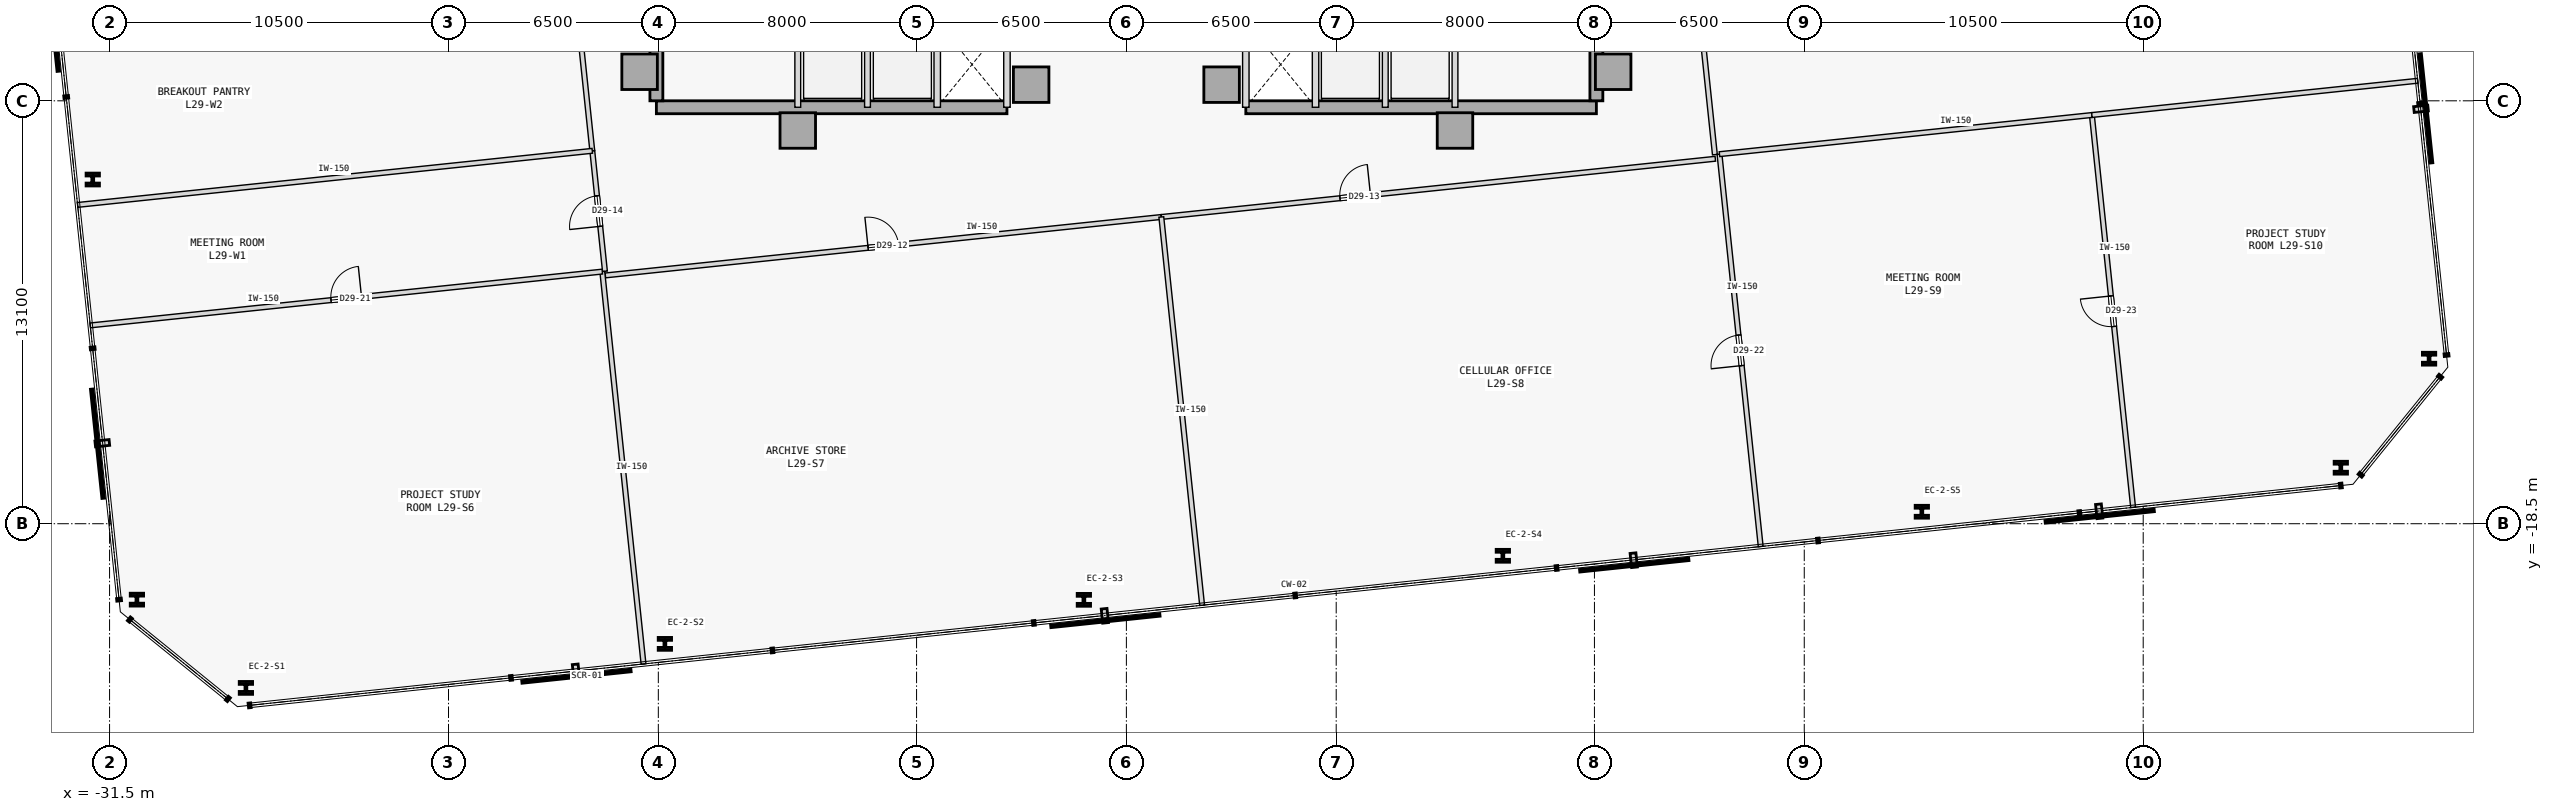
"""IFC4 building model, lengths in metres.
Left out: names, types, materials, properties, quantities, classifications, styles, units other than length and angle.
Written with IfcOpenShell. Run it as: python <this file> out.ifc"""

import sys

from ifc_helpers import new_model, si_unit, direction, frame, frame_2d, origin, origin_2d, place, context, subcontext, project, spatial, rectangle, i_section, extrude, element, fill, save


model = new_model("IFC4")
c1 = context("Model", 3, precision=1e-05, world=origin(), true_north=direction((0.0, 1.0)))
c2 = subcontext(c1, "Body", "Model", "MODEL_VIEW")
j1 = project(units=[si_unit("LENGTHUNIT", "METRE"), si_unit("PLANEANGLEUNIT", "RADIAN")], contexts=[c1])
p1 = place(None, origin())
s1 = spatial("IfcSite", under=j1, at=p1, CompositionType="ELEMENT")
p2 = place(p1, origin())
s2 = spatial("IfcBuilding", under=s1, at=p2, CompositionType="ELEMENT")
p3 = place(p2, frame((0.0, 0.0, 117.0)))
s3 = spatial("IfcBuildingStorey", under=s2, at=p3, CompositionType="ELEMENT", Elevation=117.0)
for number, where, z_axis, x_axis in (
    (1, (-15.08, -4.5, 0.0), (0.0, 0.0, 1.0), (1.0, 0.0, 0.0)),
    (2, (-10.18, -6.32, 0.0), (0.0, 0.0, 1.0), (1.0, 0.0, 0.0)),
    (3, (-2.95, -4.9, 0.0), (0.0, 0.0, 1.0), (1.0, 0.0, 0.0)),
    (4, (15.08, -4.5, 0.0), (0.0, 0.0, 1.0), (1.0, 0.0, 0.0)),
    (5, (10.18, -6.32, 0.0), (0.0, 0.0, 1.0), (1.0, 0.0, 0.0)),
    (6, (2.95, -4.9, 0.0), (0.0, 0.0, 1.0), (1.0, 0.0, 0.0)),
):
    element("IfcColumn", number, at=place(p3, frame(where, z_axis=z_axis, x_axis=x_axis)), inside=s3, PredefinedType="COLUMN", context=c2, shape_type="SweptSolid", body=[
        extrude(rectangle(XDim=1.1, YDim=1.1, at=origin_2d()), origin(), (0.0, 0.0, 1.0), 3.7),
    ])
p4 = place(p3, frame((-14.56, -5.6, 0.0), z_axis=(0.0, 0.0, 1.0), x_axis=(1.0, 0.0, 0.0)))
e7 = element("IfcWall", 7, at=p4, inside=s3, PredefinedType="SHEAR", context=c2, shape_type="SweptSolid", body=[
    extrude(rectangle(XDim=10.86, YDim=0.4, at=frame_2d((5.43, 0.0))), origin(), (0.0, 0.0, 1.0), 3.475),
])
p5 = place(p3, frame((-14.56, -5.4, 0.0), z_axis=(0.0, 0.0, 1.0), x_axis=(0.0, 1.0, 0.0)))
e8 = element("IfcWall", 8, at=p5, inside=s3, PredefinedType="SHEAR", context=c2, shape_type="SweptSolid", body=[
    extrude(rectangle(XDim=10.8, YDim=0.4, at=frame_2d((5.4, 0.0))), origin(), (0.0, 0.0, 1.0), 3.475),
])
p6 = place(p3, frame((3.7, -5.6, 0.0), z_axis=(0.0, 0.0, 1.0), x_axis=(1.0, 0.0, 0.0)))
e9 = element("IfcWall", 9, at=p6, inside=s3, PredefinedType="SHEAR", context=c2, shape_type="SweptSolid", body=[
    extrude(rectangle(XDim=10.86, YDim=0.4, at=frame_2d((5.43, 0.0))), origin(), (0.0, 0.0, 1.0), 3.475),
])
p7 = place(p3, frame((14.56, -5.4, 0.0), z_axis=(0.0, 0.0, 1.0), x_axis=(0.0, 1.0, 0.0)))
e10 = element("IfcWall", 10, at=p7, inside=s3, PredefinedType="SHEAR", context=c2, shape_type="SweptSolid", body=[
    extrude(rectangle(XDim=10.8, YDim=0.4, at=frame_2d((5.4, 0.0))), origin(), (0.0, 0.0, 1.0), 3.475),
])
for number, where, z_axis, x_axis in (
    (11, (-27.276, -23.586, 0.0), (0.0, 0.0, 1.0), (1.0, 0.0, 0.0)),
    (12, (-14.297, -22.222, 0.0), (0.0, 0.0, 1.0), (1.0, 0.0, 0.0)),
    (13, (-1.317, -20.858, 0.0), (0.0, 0.0, 1.0), (1.0, 0.0, 0.0)),
    (14, (11.663, -19.494, 0.0), (0.0, 0.0, 1.0), (1.0, 0.0, 0.0)),
    (15, (24.642, -18.129, 0.0), (0.0, 0.0, 1.0), (1.0, 0.0, 0.0)),
    (16, (37.622, -16.765, 0.0), (0.0, 0.0, 1.0), (1.0, 0.0, 0.0)),
    (17, (40.356, -13.389, 0.0), (0.0, 0.0, 1.0), (1.0, 0.0, 0.0)),
    (18, (-32.021, -7.838, 0.0), (0.0, 0.0, 1.0), (1.0, 0.0, 0.0)),
    (19, (-30.653, -20.852, 0.0), (0.0, 0.0, 1.0), (1.0, 0.0, 0.0)),
):
    element("IfcColumn", number, at=place(p3, frame(where, z_axis=z_axis, x_axis=x_axis)), inside=s3, PredefinedType="COLUMN", context=c2, shape_type="SweptSolid", body=[
        extrude(i_section(OverallWidth=0.413, OverallDepth=0.398, WebThickness=0.056, FlangeThickness=0.089, FilletRadius=0.015, at=origin_2d()), origin(), (0.0, 0.0, 1.0), 3.7),
    ])
for number, where, z_axis, x_axis in (
    (20, (-3.7, -5.6, 0.0), (0.0, 0.0, 1.0), (0.0, 1.0, 0.0)),
    (21, (-5.86, -5.6, 0.0), (0.0, 0.0, 1.0), (0.0, 1.0, 0.0)),
):
    element("IfcWall", number, at=place(p3, frame(where, z_axis=z_axis, x_axis=x_axis)), inside=s3, PredefinedType="STANDARD", context=c2, shape_type="SweptSolid", body=[
        extrude(rectangle(XDim=2.65, YDim=0.2, at=frame_2d((1.325, 0.0))), origin(), (0.0, 0.0, 1.0), 3.475),
    ])
for number, where, z_axis, x_axis in (
    (22, (-10.18, -5.6, 0.0), (0.0, 0.0, 1.0), (0.0, 1.0, 0.0)),
    (23, (-8.02, -5.6, 0.0), (0.0, 0.0, 1.0), (0.0, 1.0, 0.0)),
):
    element("IfcWall", number, at=place(p3, frame(where, z_axis=z_axis, x_axis=x_axis)), inside=s3, PredefinedType="STANDARD", context=c2, shape_type="SweptSolid", body=[
        extrude(rectangle(XDim=2.65, YDim=0.18, at=frame_2d((1.325, 0.0))), origin(), (0.0, 0.0, 1.0), 3.475),
    ])
for number, where, z_axis, x_axis in (
    (24, (3.7, -5.6, 0.0), (0.0, 0.0, 1.0), (0.0, 1.0, 0.0)),
    (25, (5.86, -5.6, 0.0), (0.0, 0.0, 1.0), (0.0, 1.0, 0.0)),
):
    element("IfcWall", number, at=place(p3, frame(where, z_axis=z_axis, x_axis=x_axis)), inside=s3, PredefinedType="STANDARD", context=c2, shape_type="SweptSolid", body=[
        extrude(rectangle(XDim=2.65, YDim=0.2, at=frame_2d((1.325, 0.0))), origin(), (0.0, 0.0, 1.0), 3.475),
    ])
for number, where, z_axis, x_axis in (
    (26, (10.18, -5.6, 0.0), (0.0, 0.0, 1.0), (0.0, 1.0, 0.0)),
    (27, (8.02, -5.6, 0.0), (0.0, 0.0, 1.0), (0.0, 1.0, 0.0)),
):
    element("IfcWall", number, at=place(p3, frame(where, z_axis=z_axis, x_axis=x_axis)), inside=s3, PredefinedType="STANDARD", context=c2, shape_type="SweptSolid", body=[
        extrude(rectangle(XDim=2.65, YDim=0.18, at=frame_2d((1.325, 0.0))), origin(), (0.0, 0.0, 1.0), 3.475),
    ])
p8 = place(p3, frame((-16.14, -10.809, 0.0), z_axis=(0.0, 0.0, 1.0), x_axis=(0.994522126729, 0.104526261998, 0.0)))
e28 = element("IfcWall", 28, at=p8, inside=s3, PredefinedType="PARTITIONING", context=c2, shape_type="SweptSolid", body=[
    extrude(rectangle(XDim=17.317, YDim=0.15, at=frame_2d((8.658, 0.0))), origin(), (0.0, 0.0, 1.0), 3.475),
])
p9 = place(p8, frame((8.184, 0.0, 0.0)))
e29 = element("IfcOpeningElement", 29, at=p9, cuts=e28, PredefinedType="OPENING", context=c2, shape_type="SweptSolid", body=[
    extrude(rectangle(XDim=0.95, YDim=2.15, at=frame_2d((0.475, 1.075))), frame((0.0, 0.085, 0.0), z_axis=(0.0, -1.0, 0.0), x_axis=(1.0, 0.0, 0.0)), (0.0, 0.0, 1.0), 0.17),
])
p10 = place(p3, frame((1.082, -8.999, 0.0), z_axis=(0.0, 0.0, 1.0), x_axis=(0.994522803526, 0.104519822363, 0.0)))
e30 = element("IfcWall", 30, at=p10, inside=s3, PredefinedType="PARTITIONING", context=c2, shape_type="SweptSolid", body=[
    extrude(rectangle(XDim=17.257, YDim=0.15, at=frame_2d((8.628, 0.0))), origin(), (0.0, 0.0, 1.0), 3.475),
])
p11 = place(p10, frame((5.565, 0.0, 0.0)))
e31 = element("IfcOpeningElement", 31, at=p11, cuts=e30, PredefinedType="OPENING", context=c2, shape_type="SweptSolid", body=[
    extrude(rectangle(XDim=0.95, YDim=2.15, at=frame_2d((0.475, 1.075))), frame((0.0, 0.085, 0.0), z_axis=(0.0, -1.0, 0.0), x_axis=(1.0, 0.0, 0.0)), (0.0, 0.0, 1.0), 0.17),
])
p12 = place(p3, frame((-16.153, -10.682, 0.0), z_axis=(0.0, 0.0, 1.0), x_axis=(-0.104539173002, 0.994520769671, 0.0)))
e32 = element("IfcWall", 32, at=p12, inside=s3, PredefinedType="PARTITIONING", context=c2, shape_type="SweptSolid", body=[
    extrude(rectangle(XDim=3.753, YDim=0.15, at=frame_2d((1.876, 0.0))), origin(), (0.0, 0.0, 1.0), 3.475),
])
p13 = place(p12, frame((1.402, 0.0, 0.0)))
e33 = element("IfcOpeningElement", 33, at=p13, cuts=e32, PredefinedType="OPENING", context=c2, shape_type="SweptSolid", body=[
    extrude(rectangle(XDim=0.95, YDim=2.15, at=frame_2d((0.475, 1.075))), frame((0.0, 0.085, 0.0), z_axis=(0.0, -1.0, 0.0), x_axis=(1.0, 0.0, 0.0)), (0.0, 0.0, 1.0), 0.17),
])
p14 = place(p3, frame((-16.546, -6.949, 0.0), z_axis=(0.0, 0.0, 1.0), x_axis=(-0.104520314957, 0.994522751756, 0.0)))
e34 = element("IfcWall", 34, at=p14, inside=s3, PredefinedType="PARTITIONING", context=c2, shape_type="SweptSolid", body=[
    extrude(rectangle(XDim=5.718, YDim=0.15, at=frame_2d((2.859, 0.0))), origin(), (0.0, 0.0, 1.0), 3.475),
])
p15 = place(p14, frame((3.242, 0.0, 0.0)))
e35 = element("IfcOpeningElement", 35, at=p15, cuts=e34, PredefinedType="OPENING", context=c2, shape_type="SweptSolid", body=[
    extrude(rectangle(XDim=0.95, YDim=2.15, at=frame_2d((0.475, 1.075))), frame((0.0, 0.085, 0.0), z_axis=(0.0, -1.0, 0.0), x_axis=(1.0, 0.0, 0.0)), (0.0, 0.0, 1.0), 0.17),
])
p16 = place(p3, frame((18.231, -7.068, 0.0), z_axis=(0.0, 0.0, 1.0), x_axis=(-0.104536082083, 0.994521094569, 0.0)))
e36 = element("IfcWall", 36, at=p16, inside=s3, PredefinedType="PARTITIONING", context=c2, shape_type="SweptSolid", body=[
    extrude(rectangle(XDim=11.794, YDim=0.15, at=frame_2d((5.897, 0.0))), origin(), (0.0, 0.0, 1.0), 3.475),
])
p17 = place(p16, frame((5.422, 0.0, 0.0)))
e37 = element("IfcOpeningElement", 37, at=p17, cuts=e36, PredefinedType="OPENING", context=c2, shape_type="SweptSolid", body=[
    extrude(rectangle(XDim=0.95, YDim=2.15, at=frame_2d((0.475, 1.075))), frame((0.0, 0.085, 0.0), z_axis=(0.0, -1.0, 0.0), x_axis=(1.0, 0.0, 0.0)), (0.0, 0.0, 1.0), 0.17),
])
p18 = place(p3, frame((-14.958, -22.844, 0.0), z_axis=(0.0, 0.0, 1.0), x_axis=(-0.104540236679, 0.994520657862, 0.0)))
e38 = element("IfcWall", 38, at=p18, inside=s3, PredefinedType="PARTITIONING", context=c2, shape_type="SweptSolid", body=[
    extrude(rectangle(XDim=12.221, YDim=0.15, at=frame_2d((6.11, 0.0))), origin(), (0.0, 0.0, 1.0), 3.475),
])
p19 = place(p3, frame((-32.099, -12.358, 0.0), z_axis=(0.0, 0.0, 1.0), x_axis=(0.994521795881, 0.104529409818, 0.0)))
e39 = element("IfcWall", 39, at=p19, inside=s3, PredefinedType="PARTITIONING", context=c2, shape_type="SweptSolid", body=[
    extrude(rectangle(XDim=15.95, YDim=0.15, at=frame_2d((7.975, 0.0))), origin(), (0.0, 0.0, 1.0), 3.475),
])
p20 = place(p19, frame((7.5, 0.0, 0.0)))
e40 = element("IfcOpeningElement", 40, at=p20, cuts=e39, PredefinedType="OPENING", context=c2, shape_type="SweptSolid", body=[
    extrude(rectangle(XDim=0.95, YDim=2.15, at=frame_2d((0.475, 1.075))), frame((0.0, 0.085, 0.0), z_axis=(0.0, -1.0, 0.0), x_axis=(1.0, 0.0, 0.0)), (0.0, 0.0, 1.0), 0.17),
])
p21 = place(p3, frame((2.346, -21.026, 0.0), z_axis=(0.0, 0.0, 1.0), x_axis=(-0.104535555083, 0.994521149963, 0.0)))
e41 = element("IfcWall", 41, at=p21, inside=s3, PredefinedType="PARTITIONING", context=c2, shape_type="SweptSolid", body=[
    extrude(rectangle(XDim=12.093, YDim=0.15, at=frame_2d((6.046, 0.0))), origin(), (0.0, 0.0, 1.0), 3.475),
])
p22 = place(p3, frame((19.651, -19.207, 0.0), z_axis=(0.0, 0.0, 1.0), x_axis=(-0.104540236679, 0.994520657862, 0.0)))
e42 = element("IfcWall", 42, at=p22, inside=s3, PredefinedType="PARTITIONING", context=c2, shape_type="SweptSolid", body=[
    extrude(rectangle(XDim=12.221, YDim=0.15, at=frame_2d((6.11, 0.0))), origin(), (0.0, 0.0, 1.0), 3.475),
])
p23 = place(p22, frame((5.635, 0.0, 0.0)))
e43 = element("IfcOpeningElement", 43, at=p23, cuts=e42, PredefinedType="OPENING", context=c2, shape_type="SweptSolid", body=[
    extrude(rectangle(XDim=0.95, YDim=2.15, at=frame_2d((0.475, 1.075))), frame((0.0, 0.085, 0.0), z_axis=(0.0, -1.0, 0.0), x_axis=(1.0, 0.0, 0.0)), (0.0, 0.0, 1.0), 0.17),
])
p24 = place(p3, frame((31.187, -17.994, 0.0), z_axis=(0.0, 0.0, 1.0), x_axis=(-0.104520477826, 0.99452273464, 0.0)))
e44 = element("IfcWall", 44, at=p24, inside=s3, PredefinedType="PARTITIONING", context=c2, shape_type="SweptSolid", body=[
    extrude(rectangle(XDim=12.221, YDim=0.15, at=frame_2d((6.11, 0.0))), origin(), (0.0, 0.0, 1.0), 3.475),
])
p25 = place(p24, frame((5.635, 0.0, 0.0)))
e45 = element("IfcOpeningElement", 45, at=p25, cuts=e44, PredefinedType="OPENING", context=c2, shape_type="SweptSolid", body=[
    extrude(rectangle(XDim=0.95, YDim=2.15, at=frame_2d((0.475, 1.075))), frame((0.0, 0.085, 0.0), z_axis=(0.0, -1.0, 0.0), x_axis=(1.0, 0.0, 0.0)), (0.0, 0.0, 1.0), 0.17),
])
p26 = place(p3, frame((18.373, -7.053, 0.0), z_axis=(0.0, 0.0, 1.0), x_axis=(0.994521010406, 0.104536882776, 0.0)))
e46 = element("IfcWall", 46, at=p26, inside=s3, PredefinedType="PARTITIONING", context=c2, shape_type="SweptSolid", body=[
    extrude(rectangle(XDim=11.6, YDim=0.15, at=frame_2d((5.8, 0.0))), origin(), (0.0, 0.0, 1.0), 3.475),
])
p27 = place(p3, frame((29.91, -5.84, 0.0), z_axis=(0.0, 0.0, 1.0), x_axis=(0.994521257273, 0.104534534165, 0.0)))
e47 = element("IfcWall", 47, at=p27, inside=s3, PredefinedType="PARTITIONING", context=c2, shape_type="SweptSolid", body=[
    extrude(rectangle(XDim=10.15, YDim=0.15, at=frame_2d((5.075, 0.0))), origin(), (0.0, 0.0, 1.0), 3.475),
])
p28 = place(p3, frame((-32.491, -8.625, 0.0), z_axis=(0.0, 0.0, 1.0), x_axis=(0.994522794159, 0.104519911488, 0.0)))
e48 = element("IfcWall", 48, at=p28, inside=s3, PredefinedType="PARTITIONING", context=c2, shape_type="SweptSolid", body=[
    extrude(rectangle(XDim=16.033, YDim=0.15, at=frame_2d((8.017, 0.0))), origin(), (0.0, 0.0, 1.0), 3.475),
])
p29 = place(p9, origin())
e49 = element("IfcDoor", 49, at=p29, inside=s3, OperationType="SINGLE_SWING_LEFT", PredefinedType="DOOR", context=c2, shape_type="SweptSolid", body=[
    extrude(rectangle(XDim=0.95, YDim=2.15, at=frame_2d((0.475, 1.075))), frame((0.0, 0.025, 0.0), z_axis=(0.0, -1.0, 0.0), x_axis=(1.0, 0.0, 0.0)), (0.0, 0.0, 1.0), 0.05),
])
fill(e29, e49)
p30 = place(p11, origin())
e50 = element("IfcDoor", 50, at=p30, inside=s3, OperationType="SINGLE_SWING_RIGHT", PredefinedType="DOOR", context=c2, shape_type="SweptSolid", body=[
    extrude(rectangle(XDim=0.95, YDim=2.15, at=frame_2d((0.475, 1.075))), frame((0.0, 0.025, 0.0), z_axis=(0.0, -1.0, 0.0), x_axis=(1.0, 0.0, 0.0)), (0.0, 0.0, 1.0), 0.05),
])
fill(e31, e50)
p31 = place(p13, origin())
e51 = element("IfcDoor", 51, at=p31, inside=s3, OperationType="SINGLE_SWING_LEFT", PredefinedType="DOOR", context=c2, shape_type="SweptSolid", body=[
    extrude(rectangle(XDim=0.95, YDim=2.15, at=frame_2d((0.475, 1.075))), frame((0.0, 0.025, 0.0), z_axis=(0.0, -1.0, 0.0), x_axis=(1.0, 0.0, 0.0)), (0.0, 0.0, 1.0), 0.05),
])
fill(e33, e51)
p32 = place(p20, origin())
e52 = element("IfcDoor", 52, at=p32, inside=s3, OperationType="SINGLE_SWING_RIGHT", PredefinedType="DOOR", context=c2, shape_type="SweptSolid", body=[
    extrude(rectangle(XDim=0.95, YDim=2.15, at=frame_2d((0.475, 1.075))), frame((0.0, 0.025, 0.0), z_axis=(0.0, -1.0, 0.0), x_axis=(1.0, 0.0, 0.0)), (0.0, 0.0, 1.0), 0.05),
])
fill(e40, e52)
p33 = place(p23, origin())
e53 = element("IfcDoor", 53, at=p33, inside=s3, OperationType="SINGLE_SWING_LEFT", PredefinedType="DOOR", context=c2, shape_type="SweptSolid", body=[
    extrude(rectangle(XDim=0.95, YDim=2.15, at=frame_2d((0.475, 1.075))), frame((0.0, 0.025, 0.0), z_axis=(0.0, -1.0, 0.0), x_axis=(1.0, 0.0, 0.0)), (0.0, 0.0, 1.0), 0.05),
])
fill(e43, e53)
p34 = place(p25, origin())
e54 = element("IfcDoor", 54, at=p34, inside=s3, OperationType="SINGLE_SWING_RIGHT", PredefinedType="DOOR", context=c2, shape_type="SweptSolid", body=[
    extrude(rectangle(XDim=0.95, YDim=2.15, at=frame_2d((0.475, 1.075))), frame((0.0, 0.025, 0.0), z_axis=(0.0, -1.0, 0.0), x_axis=(1.0, 0.0, 0.0)), (0.0, 0.0, 1.0), 0.05),
])
fill(e45, e54)
save(model, sys.argv[1])
